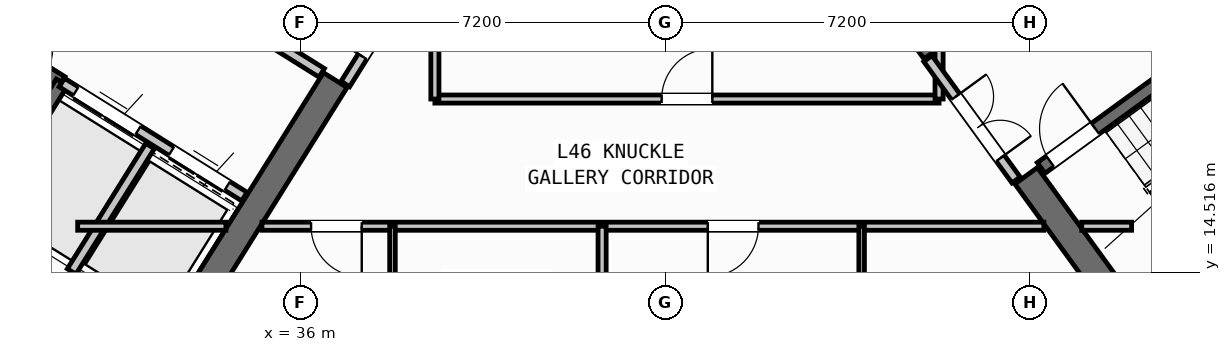
"""IFC4 building model, lengths in metres.
Left out: names, types, materials, properties, quantities, classifications, styles, units other than length and angle.
Written with IfcOpenShell. Run it as: python <this file> out.ifc"""

import sys

from ifc_helpers import new_model, si_unit, direction, frame, frame_2d, origin, place, context, subcontext, project, spatial, rectangle, extrude, source, transform, mapped, element, fill, save


model = new_model("IFC4")
c1 = context("Model", 3, precision=1e-05, world=origin(), true_north=direction((0.0, 1.0)))
c2 = subcontext(c1, "Body", "Model", "MODEL_VIEW")
j1 = project(units=[si_unit("LENGTHUNIT", "METRE"), si_unit("PLANEANGLEUNIT", "RADIAN")], contexts=[c1])
p1 = place(None, origin())
s1 = spatial("IfcSite", under=j1, at=p1, CompositionType="ELEMENT")
p2 = place(p1, origin())
s2 = spatial("IfcBuilding", under=s1, at=p2, CompositionType="ELEMENT")
p3 = place(p2, frame((0.0, 0.0, 184.2)))
s3 = spatial("IfcBuildingStorey", under=s2, at=p3, CompositionType="ELEMENT", Elevation=184.2)
p4 = place(p3, frame((33.366, 12.477, 0.0), z_axis=(0.0, 0.0, 1.0), x_axis=(-0.848047359947, 0.529920442413, 0.0)))
e1 = element("IfcWall", 1, at=p4, inside=s3, PredefinedType="SHEAR", context=c2, shape_type="SweptSolid", body=[
    extrude(rectangle(XDim=13.14, YDim=0.55, at=frame_2d((6.57, 0.0))), origin(), (0.0, 0.0, 1.0), 3.35),
])
p5 = place(p3, frame((36.683, 18.304, 0.0), z_axis=(0.0, 0.0, 1.0), x_axis=(-0.529896466841, -0.848062341122, 0.0)))
e2 = element("IfcWall", 2, at=p5, inside=s3, PredefinedType="SHEAR", context=c2, shape_type="SweptSolid", body=[
    extrude(rectangle(XDim=6.425, YDim=0.55, at=frame_2d((3.212, 0.0))), origin(), (0.0, 0.0, 1.0), 3.35),
])
p6 = place(p3, frame((52.359, 13.14, 0.0), z_axis=(0.0, 0.0, 1.0), x_axis=(0.809014896919, 0.587788139183, 0.0)))
e3 = element("IfcWall", 3, at=p6, inside=s3, PredefinedType="SHEAR", context=c2, shape_type="SweptSolid", body=[
    extrude(rectangle(XDim=12.34, YDim=0.55, at=frame_2d((6.17, 0.0))), origin(), (0.0, 0.0, 1.0), 3.35),
])
p7 = place(p3, frame((52.42, 13.524, 0.0), z_axis=(0.0, 0.0, 1.0), x_axis=(-0.587802113096, 0.809004744015, 0.0)))
e4 = element("IfcWall", 4, at=p7, inside=s3, PredefinedType="SHEAR", context=c2, shape_type="SweptSolid", body=[
    extrude(rectangle(XDim=3.575, YDim=0.55, at=frame_2d((1.788, 0.0))), origin(), (0.0, 0.0, 1.0), 3.35),
])
p8 = place(p3, frame((48.526, 18.884, 0.0), z_axis=(0.0, 0.0, 1.0), x_axis=(-0.587764933797, 0.809031756236, 0.0)))
e5 = element("IfcWall", 5, at=p8, inside=s3, PredefinedType="SHEAR", context=c2, shape_type="SweptSolid", body=[
    extrude(rectangle(XDim=6.425, YDim=0.55, at=frame_2d((3.212, 0.0))), origin(), (0.0, 0.0, 1.0), 3.35),
])
p9 = place(p3, frame((31.76, 12.183, 0.0), z_axis=(0.0, 0.0, 1.0), x_axis=(-0.848047074256, 0.529920899612, 0.0)))
e6 = element("IfcWall", 6, at=p9, inside=s3, PredefinedType="STANDARD", context=c2, shape_type="SweptSolid", body=[
    extrude(rectangle(XDim=30.652, YDim=0.32, at=frame_2d((15.326, 0.0))), origin(), (0.0, 0.0, 1.0), 3.35),
])
p10 = place(p9, frame((15.166, 0.0, 0.0)))
e7 = element("IfcOpeningElement", 7, at=p10, cuts=e6, PredefinedType="OPENING", context=c2, shape_type="SweptSolid", body=[
    extrude(rectangle(XDim=1.2, YDim=2.15, at=frame_2d((0.6, 1.075))), frame((0.0, 0.17, 0.0), z_axis=(0.0, -1.0, 0.0), x_axis=(1.0, 0.0, 0.0)), (0.0, 0.0, 1.0), 0.34),
])
p11 = place(p9, frame((2.015, 0.0, 0.8)))
e8 = element("IfcOpeningElement", 8, at=p11, cuts=e6, PredefinedType="OPENING", context=c2, shape_type="SweptSolid", body=[
    extrude(rectangle(XDim=2.1, YDim=1.55, at=frame_2d((1.05, 0.775))), frame((0.0, 0.17, 0.0), z_axis=(0.0, -1.0, 0.0), x_axis=(1.0, 0.0, 0.0)), (0.0, 0.0, 1.0), 0.34),
])
p12 = place(p9, frame((7.244, 0.0, 0.8)))
e9 = element("IfcOpeningElement", 9, at=p12, cuts=e6, PredefinedType="OPENING", context=c2, shape_type="SweptSolid", body=[
    extrude(rectangle(XDim=2.1, YDim=1.55, at=frame_2d((1.05, 0.775))), frame((0.0, 0.17, 0.0), z_axis=(0.0, -1.0, 0.0), x_axis=(1.0, 0.0, 0.0)), (0.0, 0.0, 1.0), 0.34),
])
p13 = place(p9, frame((12.623, 0.0, 1.0)))
e10 = element("IfcOpeningElement", 10, at=p13, cuts=e6, PredefinedType="OPENING", context=c2, shape_type="SweptSolid", body=[
    extrude(rectangle(XDim=0.9, YDim=1.25, at=frame_2d((0.45, 0.625))), frame((0.0, 0.17, 0.0), z_axis=(0.0, -1.0, 0.0), x_axis=(1.0, 0.0, 0.0)), (0.0, 0.0, 1.0), 0.34),
])
p14 = place(p9, frame((19.565, 0.0, 0.95)))
e11 = element("IfcOpeningElement", 11, at=p14, cuts=e6, PredefinedType="OPENING", context=c2, shape_type="SweptSolid", body=[
    extrude(rectangle(XDim=1.2, YDim=1.4, at=frame_2d((0.6, 0.7))), frame((0.0, 0.17, 0.0), z_axis=(0.0, -1.0, 0.0), x_axis=(1.0, 0.0, 0.0)), (0.0, 0.0, 1.0), 0.34),
])
p15 = place(p9, frame((25.983, 0.0, 1.0)))
e12 = element("IfcOpeningElement", 12, at=p15, cuts=e6, PredefinedType="OPENING", context=c2, shape_type="SweptSolid", body=[
    extrude(rectangle(XDim=0.9, YDim=1.25, at=frame_2d((0.45, 0.625))), frame((0.0, 0.17, 0.0), z_axis=(0.0, -1.0, 0.0), x_axis=(1.0, 0.0, 0.0)), (0.0, 0.0, 1.0), 0.34),
])
p16 = place(p9, frame((28.433, 0.0, 1.0)))
e13 = element("IfcOpeningElement", 13, at=p16, cuts=e6, PredefinedType="OPENING", context=c2, shape_type="SweptSolid", body=[
    extrude(rectangle(XDim=0.9, YDim=1.25, at=frame_2d((0.45, 0.625))), frame((0.0, 0.17, 0.0), z_axis=(0.0, -1.0, 0.0), x_axis=(1.0, 0.0, 0.0)), (0.0, 0.0, 1.0), 0.34),
])
p17 = place(p3, frame((31.28, 18.261, 0.0), z_axis=(0.0, 0.0, 1.0), x_axis=(-0.848051618787, 0.529913626805, 0.0)))
e14 = element("IfcWall", 14, at=p17, inside=s3, PredefinedType="SHEAR", context=c2, shape_type="SweptSolid", body=[
    extrude(rectangle(XDim=7.46, YDim=0.26, at=frame_2d((3.73, 0.0))), origin(), (0.0, 0.0, 1.0), 3.35),
])
p18 = place(p17, frame((0.36, 0.0, 0.0)))
e15 = element("IfcOpeningElement", 15, at=p18, cuts=e14, PredefinedType="OPENING", context=c2, shape_type="SweptSolid", body=[
    extrude(rectangle(XDim=0.86, YDim=2.05, at=frame_2d((0.43, 1.025))), frame((0.0, 0.14, 0.0), z_axis=(0.0, -1.0, 0.0), x_axis=(1.0, 0.0, 0.0)), (0.0, 0.0, 1.0), 0.28),
])
p19 = place(p3, frame((31.288, 18.256, 0.0), z_axis=(0.0, 0.0, 1.0), x_axis=(-0.529943379326, -0.848033026897, 0.0)))
e16 = element("IfcWall", 16, at=p19, inside=s3, PredefinedType="SHEAR", context=c2, shape_type="SweptSolid", body=[
    extrude(rectangle(XDim=3.16, YDim=0.26, at=frame_2d((1.58, 0.0))), origin(), (0.0, 0.0, 1.0), 3.35),
])
p20 = place(p3, frame((34.891, 16.005, 0.0), z_axis=(0.0, 0.0, 1.0), x_axis=(-0.848062873452, 0.529895614884, 0.0)))
e17 = element("IfcWall", 17, at=p20, inside=s3, PredefinedType="STANDARD", context=c2, shape_type="SweptSolid", body=[
    extrude(rectangle(XDim=4.248, YDim=0.2, at=frame_2d((2.124, 0.0))), origin(), (0.0, 0.0, 1.0), 3.34),
])
p21 = place(p20, frame((0.398, 0.0, 0.0)))
e18 = element("IfcOpeningElement", 18, at=p21, cuts=e17, PredefinedType="OPENING", context=c2, shape_type="SweptSolid", body=[
    extrude(rectangle(XDim=1.3, YDim=2.2, at=frame_2d((0.65, 1.1))), frame((0.0, 0.11, 0.0), z_axis=(0.0, -1.0, 0.0), x_axis=(1.0, 0.0, 0.0)), (0.0, 0.0, 1.0), 0.22),
])
p22 = place(p20, frame((2.473, 0.0, 0.0)))
e19 = element("IfcOpeningElement", 19, at=p22, cuts=e17, PredefinedType="OPENING", context=c2, shape_type="SweptSolid", body=[
    extrude(rectangle(XDim=1.45, YDim=2.25, at=frame_2d((0.725, 1.125))), frame((0.0, 0.11, 0.0), z_axis=(0.0, -1.0, 0.0), x_axis=(1.0, 0.0, 0.0)), (0.0, 0.0, 1.0), 0.22),
])
p23 = place(p3, frame((36.417, 18.447, 0.0), z_axis=(0.0, 0.0, 1.0), x_axis=(-0.848064879198, 0.529892404805, 0.0)))
e20 = element("IfcWall", 20, at=p23, inside=s3, PredefinedType="STANDARD", context=c2, shape_type="SweptSolid", body=[
    extrude(rectangle(XDim=5.768, YDim=0.2, at=frame_2d((2.884, 0.0))), origin(), (0.0, 0.0, 1.0), 3.34),
])
p24 = place(p23, frame((2.548, 0.0, 0.0)))
e21 = element("IfcOpeningElement", 21, at=p24, cuts=e20, PredefinedType="OPENING", context=c2, shape_type="SweptSolid", body=[
    extrude(rectangle(XDim=1.15, YDim=2.1, at=frame_2d((0.575, 1.05))), frame((0.0, 0.11, 0.0), z_axis=(0.0, -1.0, 0.0), x_axis=(1.0, 0.0, 0.0)), (0.0, 0.0, 1.0), 0.22),
])
p25 = place(p3, frame((33.029, 17.003, 0.0), z_axis=(0.0, 0.0, 1.0), x_axis=(-0.529916267533, -0.848049968695, 0.0)))
e22 = element("IfcWall", 22, at=p25, inside=s3, PredefinedType="STANDARD", context=c2, shape_type="SweptSolid", body=[
    extrude(rectangle(XDim=2.92, YDim=0.2, at=frame_2d((1.46, 0.0))), origin(), (0.0, 0.0, 1.0), 3.34),
])
p26 = place(p3, frame((52.472, 14.013, 0.0), z_axis=(0.0, 0.0, 1.0), x_axis=(0.809028366311, 0.587769599847, 0.0)))
e23 = element("IfcWall", 23, at=p26, inside=s3, PredefinedType="SHEAR", context=c2, shape_type="SweptSolid", body=[
    extrude(rectangle(XDim=7.33, YDim=0.26, at=frame_2d((3.665, 0.0))), origin(), (0.0, 0.0, 1.0), 3.35),
])
p27 = place(p3, frame((50.615, 16.57, 0.0), z_axis=(0.0, 0.0, 1.0), x_axis=(0.809028366311, 0.587769599847, 0.0)))
e24 = element("IfcWall", 24, at=p27, inside=s3, PredefinedType="SHEAR", context=c2, shape_type="SweptSolid", body=[
    extrude(rectangle(XDim=7.33, YDim=0.26, at=frame_2d((3.665, 0.0))), origin(), (0.0, 0.0, 1.0), 3.35),
])
p28 = place(p27, frame((0.22, 0.0, 0.0)))
e25 = element("IfcOpeningElement", 25, at=p28, cuts=e24, PredefinedType="OPENING", context=c2, shape_type="SweptSolid", body=[
    extrude(rectangle(XDim=1.1, YDim=2.1, at=frame_2d((0.55, 1.05))), frame((0.0, 0.14, 0.0), z_axis=(0.0, -1.0, 0.0), x_axis=(1.0, 0.0, 0.0)), (0.0, 0.0, 1.0), 0.28),
])
p29 = place(p3, frame((38.451, 20.737, 0.0), z_axis=(0.0, 0.0, 1.0), x_axis=(-0.529924799939, -0.848044637038, 0.0)))
e26 = element("IfcWall", 26, at=p29, inside=s3, PredefinedType="STANDARD", context=c2, shape_type="SweptSolid", body=[
    extrude(rectangle(XDim=2.96, YDim=0.2, at=frame_2d((1.48, 0.0))), origin(), (0.0, 0.0, 1.0), 3.34),
])
p30 = place(p29, frame((1.46, 0.0, 0.0)))
e27 = element("IfcOpeningElement", 27, at=p30, cuts=e26, PredefinedType="OPENING", context=c2, shape_type="SweptSolid", body=[
    extrude(rectangle(XDim=0.86, YDim=2.05, at=frame_2d((0.43, 1.025))), frame((0.0, 0.11, 0.0), z_axis=(0.0, -1.0, 0.0), x_axis=(1.0, 0.0, 0.0)), (0.0, 0.0, 1.0), 0.22),
])
p31 = place(p3, frame((31.6, 15.42, 0.0), z_axis=(0.0, 0.0, 1.0), x_axis=(1.0, 0.0, 0.0)))
e28 = element("IfcWall", 28, at=p31, inside=s3, PredefinedType="PARTITIONING", context=c2, shape_type="SweptSolid", body=[
    extrude(rectangle(XDim=2.925, YDim=0.16, at=frame_2d((1.462, 0.0))), origin(), (0.0, 0.0, 1.0), 3.34),
])
p32 = place(p3, frame((35.237, 15.42, 0.0), z_axis=(0.0, 0.0, 1.0), x_axis=(1.0, 0.0, 0.0)))
e29 = element("IfcWall", 29, at=p32, inside=s3, PredefinedType="PARTITIONING", context=c2, shape_type="SweptSolid", body=[
    extrude(rectangle(XDim=15.432, YDim=0.16, at=frame_2d((7.716, 0.0))), origin(), (0.0, 0.0, 1.0), 3.34),
])
p33 = place(p32, frame((0.969, 0.0, 0.0)))
e30 = element("IfcOpeningElement", 30, at=p33, cuts=e29, PredefinedType="OPENING", context=c2, shape_type="SweptSolid", body=[
    extrude(rectangle(XDim=1.0, YDim=2.1, at=frame_2d((0.5, 1.05))), frame((0.0, 0.09, 0.0), z_axis=(0.0, -1.0, 0.0), x_axis=(1.0, 0.0, 0.0)), (0.0, 0.0, 1.0), 0.18),
])
p34 = place(p32, frame((8.799, 0.0, 0.0)))
e31 = element("IfcOpeningElement", 31, at=p34, cuts=e29, PredefinedType="OPENING", context=c2, shape_type="SweptSolid", body=[
    extrude(rectangle(XDim=1.0, YDim=2.1, at=frame_2d((0.5, 1.05))), frame((0.0, 0.09, 0.0), z_axis=(0.0, -1.0, 0.0), x_axis=(1.0, 0.0, 0.0)), (0.0, 0.0, 1.0), 0.18),
])
p35 = place(p3, frame((51.416, 15.42, 0.0), z_axis=(0.0, 0.0, 1.0), x_axis=(1.0, 0.0, 0.0)))
e32 = element("IfcWall", 32, at=p35, inside=s3, PredefinedType="PARTITIONING", context=c2, shape_type="SweptSolid", body=[
    extrude(rectangle(XDim=0.984, YDim=0.16, at=frame_2d((0.492, 0.0))), origin(), (0.0, 0.0, 1.0), 3.34),
])
p36 = place(p3, frame((38.65, 17.93, 0.0), z_axis=(0.0, 0.0, 1.0), x_axis=(1.0, 0.0, 0.0)))
e33 = element("IfcWall", 33, at=p36, inside=s3, PredefinedType="PARTITIONING", context=c2, shape_type="SweptSolid", body=[
    extrude(rectangle(XDim=9.95, YDim=0.16, at=frame_2d((4.975, 0.0))), origin(), (0.0, 0.0, 1.0), 3.34),
])
p37 = place(p36, frame((4.475, 0.0, 0.0)))
e34 = element("IfcOpeningElement", 34, at=p37, cuts=e33, PredefinedType="OPENING", context=c2, shape_type="SweptSolid", body=[
    extrude(rectangle(XDim=1.0, YDim=2.1, at=frame_2d((0.5, 1.05))), frame((0.0, 0.09, 0.0), z_axis=(0.0, -1.0, 0.0), x_axis=(1.0, 0.0, 0.0)), (0.0, 0.0, 1.0), 0.18),
])
p38 = place(p3, frame((38.65, 17.93, 0.0), z_axis=(0.0, 0.0, 1.0), x_axis=(0.0, 1.0, 0.0)))
e35 = element("IfcWall", 35, at=p38, inside=s3, PredefinedType="PARTITIONING", context=c2, shape_type="SweptSolid", body=[
    extrude(rectangle(XDim=2.951, YDim=0.16, at=frame_2d((1.476, 0.0))), origin(), (0.0, 0.0, 1.0), 3.34),
])
p39 = place(p3, frame((48.6, 17.93, 0.0), z_axis=(0.0, 0.0, 1.0), x_axis=(0.0, 1.0, 0.0)))
e36 = element("IfcWall", 36, at=p39, inside=s3, PredefinedType="PARTITIONING", context=c2, shape_type="SweptSolid", body=[
    extrude(rectangle(XDim=0.993, YDim=0.16, at=frame_2d((0.496, 0.0))), origin(), (0.0, 0.0, 1.0), 3.34),
])
p40 = place(p3, frame((50.119, 16.333, 0.0), z_axis=(0.0, 0.0, 1.0), x_axis=(-0.587749856981, 0.809042709391, 0.0)))
e37 = element("IfcWall", 37, at=p40, inside=s3, PredefinedType="STANDARD", context=c2, shape_type="SweptSolid", body=[
    extrude(rectangle(XDim=2.96, YDim=0.2, at=frame_2d((1.48, 0.0))), origin(), (0.0, 0.0, 1.0), 3.34),
])
p41 = place(p40, frame((0.53, 0.0, 0.0)))
e38 = element("IfcOpeningElement", 38, at=p41, cuts=e37, PredefinedType="OPENING", context=c2, shape_type="SweptSolid", body=[
    extrude(rectangle(XDim=1.5, YDim=2.15, at=frame_2d((0.75, 1.075))), frame((0.0, 0.11, 0.0), z_axis=(0.0, -1.0, 0.0), x_axis=(1.0, 0.0, 0.0)), (0.0, 0.0, 1.0), 0.22),
])
p42 = place(p3, frame((41.95, 1.96, 0.0), z_axis=(0.0, 0.0, 1.0), x_axis=(0.0, 1.0, 0.0)))
e39 = element("IfcWall", 39, at=p42, inside=s3, PredefinedType="PARTITIONING", context=c2, shape_type="SweptSolid", body=[
    extrude(rectangle(XDim=13.46, YDim=0.16, at=frame_2d((6.73, 0.0))), origin(), (0.0, 0.0, 1.0), 3.34),
])
p43 = place(p3, frame((37.813, 1.96, 0.0), z_axis=(0.0, 0.0, 1.0), x_axis=(0.0, 1.0, 0.0)))
e40 = element("IfcWall", 40, at=p43, inside=s3, PredefinedType="PARTITIONING", context=c2, shape_type="SweptSolid", body=[
    extrude(rectangle(XDim=13.46, YDim=0.11, at=frame_2d((6.73, 0.0))), origin(), (0.0, 0.0, 1.0), 3.34),
])
p44 = place(p43, frame((5.5, 0.0, 0.0)))
e41 = element("IfcOpeningElement", 41, at=p44, cuts=e40, PredefinedType="OPENING", context=c2, shape_type="SweptSolid", body=[
    extrude(rectangle(XDim=0.92, YDim=2.08, at=frame_2d((0.46, 1.04))), frame((0.0, 0.065, 0.0), z_axis=(0.0, -1.0, 0.0), x_axis=(1.0, 0.0, 0.0)), (0.0, 0.0, 1.0), 0.13),
])
p45 = place(p43, frame((10.45, 0.0, 0.0)))
e42 = element("IfcOpeningElement", 42, at=p45, cuts=e40, PredefinedType="OPENING", context=c2, shape_type="SweptSolid", body=[
    extrude(rectangle(XDim=0.88, YDim=2.08, at=frame_2d((0.44, 1.04))), frame((0.0, 0.065, 0.0), z_axis=(0.0, -1.0, 0.0), x_axis=(1.0, 0.0, 0.0)), (0.0, 0.0, 1.0), 0.13),
])
p46 = place(p3, frame((47.072, 1.96, 0.0), z_axis=(0.0, 0.0, 1.0), x_axis=(0.0, 1.0, 0.0)))
e43 = element("IfcWall", 43, at=p46, inside=s3, PredefinedType="PARTITIONING", context=c2, shape_type="SweptSolid", body=[
    extrude(rectangle(XDim=13.46, YDim=0.11, at=frame_2d((6.73, 0.0))), origin(), (0.0, 0.0, 1.0), 3.34),
])
p47 = place(p46, frame((6.6, 0.0, 0.0)))
e44 = element("IfcOpeningElement", 44, at=p47, cuts=e43, PredefinedType="OPENING", context=c2, shape_type="SweptSolid", body=[
    extrude(rectangle(XDim=0.92, YDim=2.08, at=frame_2d((0.46, 1.04))), frame((0.0, 0.065, 0.0), z_axis=(0.0, -1.0, 0.0), x_axis=(1.0, 0.0, 0.0)), (0.0, 0.0, 1.0), 0.13),
])
p48 = place(p46, frame((11.1, 0.0, 0.0)))
e45 = element("IfcOpeningElement", 45, at=p48, cuts=e43, PredefinedType="OPENING", context=c2, shape_type="SweptSolid", body=[
    extrude(rectangle(XDim=0.88, YDim=2.08, at=frame_2d((0.44, 1.04))), frame((0.0, 0.065, 0.0), z_axis=(0.0, -1.0, 0.0), x_axis=(1.0, 0.0, 0.0)), (0.0, 0.0, 1.0), 0.13),
])
m1 = source(origin(), c2, "Body", "SweptSolid", [
    extrude(rectangle(XDim=1.3, YDim=2.2, at=frame_2d((0.65, 1.1))), frame((0.0, 0.025, 0.0), z_axis=(0.0, -1.0, 0.0), x_axis=(1.0, 0.0, 0.0)), (0.0, 0.0, 1.0), 0.05),
])
p49 = place(p21, origin())
e46 = element("IfcDoor", 46, at=p49, inside=s3, OperationType="DOUBLE_DOOR_SLIDING", PredefinedType="DOOR", context=c2, shape_type="MappedRepresentation", body=[
    mapped(m1, transform((0.0, 0.0, 0.0), scale=1.0)),
])
fill(e18, e46)
m2 = source(origin(), c2, "Body", "SweptSolid", [
    extrude(rectangle(XDim=1.45, YDim=2.25, at=frame_2d((0.725, 1.125))), frame((0.0, 0.025, 0.0), z_axis=(0.0, -1.0, 0.0), x_axis=(1.0, 0.0, 0.0)), (0.0, 0.0, 1.0), 0.05),
])
p50 = place(p22, origin())
e47 = element("IfcDoor", 47, at=p50, inside=s3, OperationType="DOUBLE_DOOR_SLIDING", PredefinedType="DOOR", context=c2, shape_type="MappedRepresentation", body=[
    mapped(m2, transform((0.0, 0.0, 0.0), scale=1.0)),
])
fill(e19, e47)
m3 = source(origin(), c2, "Body", "SweptSolid", [
    extrude(rectangle(XDim=1.1, YDim=2.1, at=frame_2d((0.55, 1.05))), frame((0.0, 0.025, 0.0), z_axis=(0.0, -1.0, 0.0), x_axis=(1.0, 0.0, 0.0)), (0.0, 0.0, 1.0), 0.05),
])
p51 = place(p28, origin())
e48 = element("IfcDoor", 48, at=p51, inside=s3, OperationType="SINGLE_SWING_RIGHT", PredefinedType="DOOR", context=c2, shape_type="MappedRepresentation", body=[
    mapped(m3, transform((0.0, 0.0, 0.0), scale=1.0)),
])
fill(e25, e48)
m4 = source(origin(), c2, "Body", "SweptSolid", [
    extrude(rectangle(XDim=1.0, YDim=2.1, at=frame_2d((0.5, 1.05))), frame((0.0, 0.025, 0.0), z_axis=(0.0, -1.0, 0.0), x_axis=(1.0, 0.0, 0.0)), (0.0, 0.0, 1.0), 0.05),
])
p52 = place(p37, origin())
e49 = element("IfcDoor", 49, at=p52, inside=s3, OperationType="SINGLE_SWING_RIGHT", PredefinedType="DOOR", context=c2, shape_type="MappedRepresentation", body=[
    mapped(m4, transform((0.0, 0.0, 0.0), scale=1.0)),
])
fill(e34, e49)
m5 = source(origin(), c2, "Body", "SweptSolid", [
    extrude(rectangle(XDim=0.86, YDim=2.05, at=frame_2d((0.43, 1.025))), frame((0.0, 0.025, 0.0), z_axis=(0.0, -1.0, 0.0), x_axis=(1.0, 0.0, 0.0)), (0.0, 0.0, 1.0), 0.05),
])
p53 = place(p30, frame((0.86, 0.0, 0.0), z_axis=(0.0, 0.0, 1.0), x_axis=(-1.0, 0.0, 0.0)))
e50 = element("IfcDoor", 50, at=p53, inside=s3, OperationType="SINGLE_SWING_LEFT", PredefinedType="DOOR", context=c2, shape_type="MappedRepresentation", body=[
    mapped(m5, transform((0.0, 0.0, 0.0), scale=1.0)),
])
fill(e27, e50)
m6 = source(origin(), c2, "Body", "SweptSolid", [
    extrude(rectangle(XDim=1.5, YDim=2.15, at=frame_2d((0.75, 1.075))), frame((0.0, 0.025, 0.0), z_axis=(0.0, -1.0, 0.0), x_axis=(1.0, 0.0, 0.0)), (0.0, 0.0, 1.0), 0.05),
])
p54 = place(p41, frame((1.5, 0.0, 0.0), z_axis=(0.0, 0.0, 1.0), x_axis=(-1.0, 0.0, 0.0)))
e51 = element("IfcDoor", 51, at=p54, inside=s3, OperationType="DOUBLE_DOOR_SINGLE_SWING", PredefinedType="DOOR", context=c2, shape_type="MappedRepresentation", body=[
    mapped(m6, transform((0.0, 0.0, 0.0), scale=1.0)),
])
fill(e38, e51)
p55 = place(p33, frame((1.0, 0.0, 0.0), z_axis=(0.0, 0.0, 1.0), x_axis=(-1.0, 0.0, 0.0)))
e52 = element("IfcDoor", 52, at=p55, inside=s3, OperationType="SINGLE_SWING_LEFT", PredefinedType="DOOR", context=c2, shape_type="MappedRepresentation", body=[
    mapped(m4, transform((0.0, 0.0, 0.0), scale=1.0)),
])
fill(e30, e52)
p56 = place(p34, frame((1.0, 0.0, 0.0), z_axis=(0.0, 0.0, 1.0), x_axis=(-1.0, 0.0, 0.0)))
e53 = element("IfcDoor", 53, at=p56, inside=s3, OperationType="SINGLE_SWING_RIGHT", PredefinedType="DOOR", context=c2, shape_type="MappedRepresentation", body=[
    mapped(m4, transform((0.0, 0.0, 0.0), scale=1.0)),
])
fill(e31, e53)
save(model, sys.argv[1])
